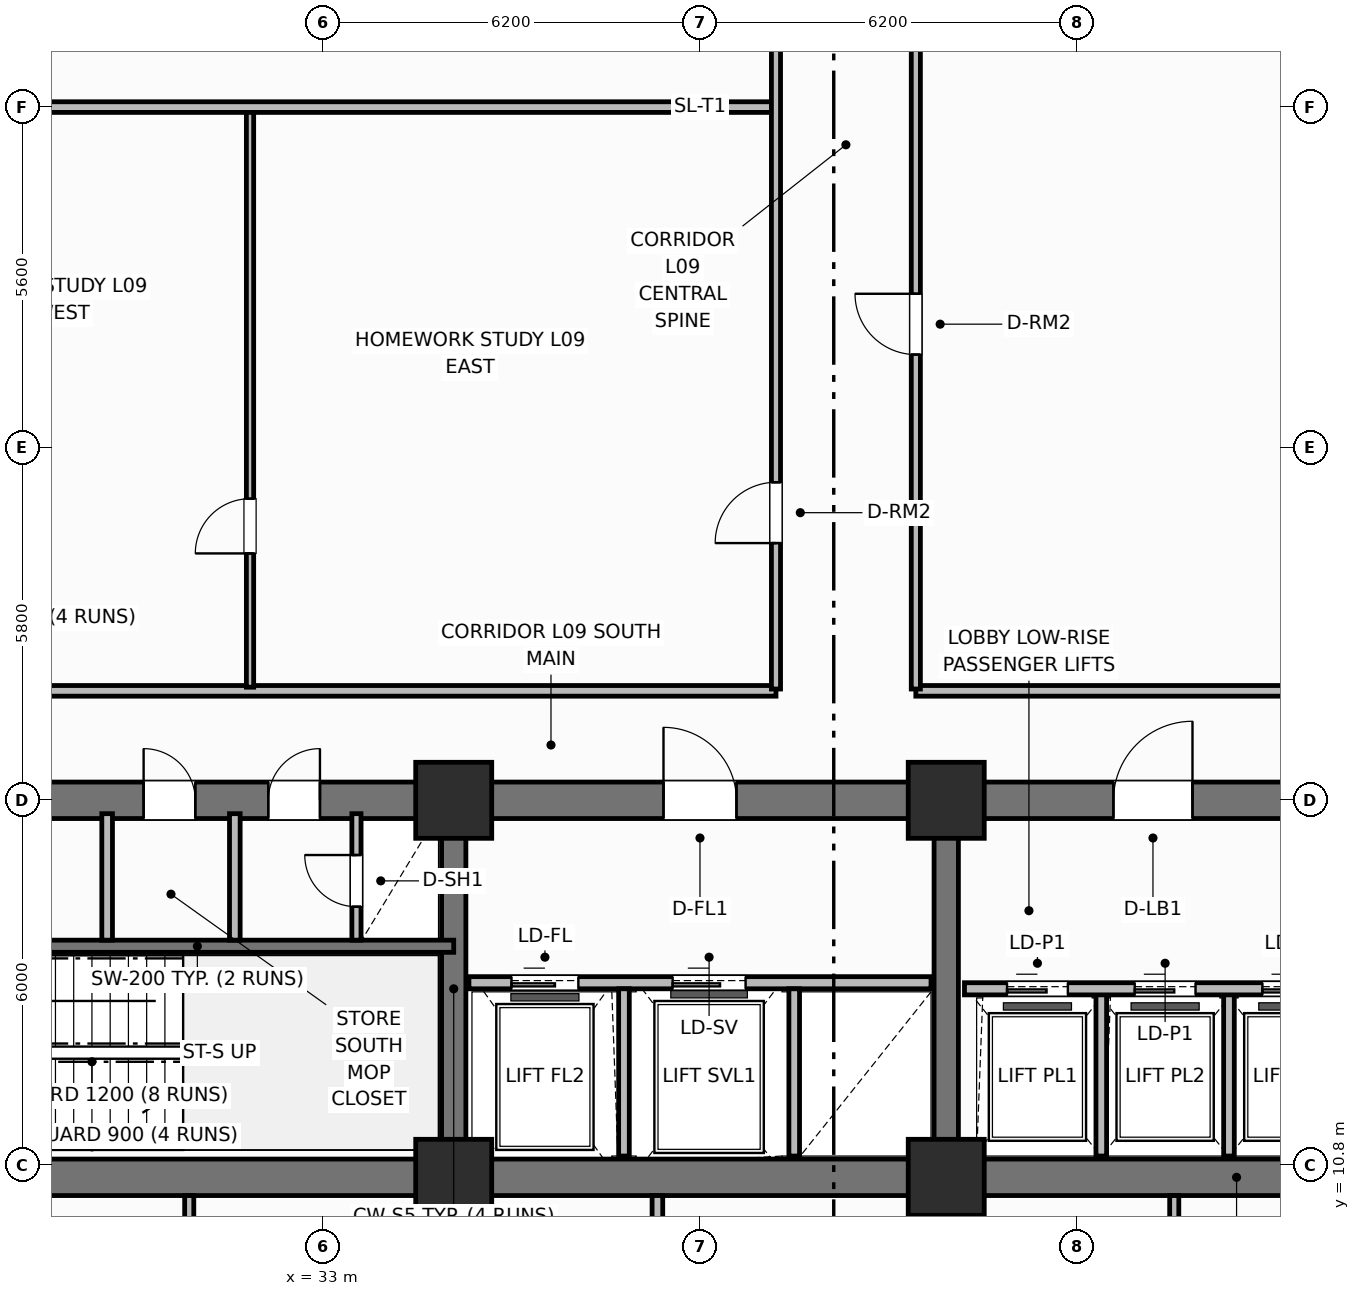
"""IFC4 building model, lengths in metres.
Left out: names, types, materials, properties, quantities, classifications, styles, units other than length and angle.
Written with IfcOpenShell. Run it as: python <this file> out.ifc"""

import sys

from ifc_helpers import new_model, si_unit, direction, frame, frame_2d, origin, origin_2d, place, context, subcontext, project, spatial, rectangle, extrude, element, fill, save


model = new_model("IFC4")
c1 = context("Model", 3, precision=1e-05, world=origin(), true_north=direction((0.0, 1.0)))
c2 = subcontext(c1, "Body", "Model", "MODEL_VIEW")
j1 = project(units=[si_unit("LENGTHUNIT", "METRE"), si_unit("PLANEANGLEUNIT", "RADIAN")], contexts=[c1])
p1 = place(None, origin())
s1 = spatial("IfcSite", under=j1, at=p1, CompositionType="ELEMENT")
p2 = place(p1, origin())
s2 = spatial("IfcBuilding", under=s1, at=p2, CompositionType="ELEMENT")
p3 = place(p2, frame((0.0, 0.0, 39.9)))
s3 = spatial("IfcBuildingStorey", under=s2, at=p3, CompositionType="ELEMENT", Elevation=39.9)
p4 = place(p3, frame((52.8, 10.6, 0.0), z_axis=(0.0, 0.0, 1.0), x_axis=(-1.0, 0.0, 0.0)))
e1 = element("IfcWall", 1, at=p4, inside=s3, PredefinedType="SHEAR", context=c2, shape_type="SweptSolid", body=[
    extrude(rectangle(XDim=27.2, YDim=0.6, at=frame_2d((13.6, 0.0))), origin(), (0.0, 0.0, 1.0), 3.7),
])
p5 = place(p3, frame((25.6, 16.8, 0.0), z_axis=(0.0, 0.0, 1.0), x_axis=(1.0, 0.0, 0.0)))
e2 = element("IfcWall", 2, at=p5, inside=s3, PredefinedType="SHEAR", context=c2, shape_type="SweptSolid", body=[
    extrude(rectangle(XDim=27.2, YDim=0.6, at=frame_2d((13.6, 0.0))), origin(), (0.0, 0.0, 1.0), 3.7),
])
p6 = place(p5, frame((1.7, 0.0, 0.0)))
e3 = element("IfcOpeningElement", 3, at=p6, cuts=e2, PredefinedType="OPENING", context=c2, shape_type="SweptSolid", body=[
    extrude(rectangle(XDim=1.1, YDim=2.15, at=frame_2d((0.55, 1.075))), frame((0.0, 0.31, 0.0), z_axis=(0.0, -1.0, 0.0), x_axis=(1.0, 0.0, 0.0)), (0.0, 0.0, 1.0), 0.62),
])
p7 = place(p5, frame((4.45, 0.0, 0.0)))
e4 = element("IfcOpeningElement", 4, at=p7, cuts=e2, PredefinedType="OPENING", context=c2, shape_type="SweptSolid", body=[
    extrude(rectangle(XDim=0.85, YDim=2.1, at=frame_2d((0.425, 1.05))), frame((0.0, 0.31, 0.0), z_axis=(0.0, -1.0, 0.0), x_axis=(1.0, 0.0, 0.0)), (0.0, 0.0, 1.0), 0.62),
])
p8 = place(p5, frame((6.5, 0.0, 0.0)))
e5 = element("IfcOpeningElement", 5, at=p8, cuts=e2, PredefinedType="OPENING", context=c2, shape_type="SweptSolid", body=[
    extrude(rectangle(XDim=0.85, YDim=2.1, at=frame_2d((0.425, 1.05))), frame((0.0, 0.31, 0.0), z_axis=(0.0, -1.0, 0.0), x_axis=(1.0, 0.0, 0.0)), (0.0, 0.0, 1.0), 0.62),
])
p9 = place(p5, frame((13.0, 0.0, 0.0)))
e6 = element("IfcOpeningElement", 6, at=p9, cuts=e2, PredefinedType="OPENING", context=c2, shape_type="SweptSolid", body=[
    extrude(rectangle(XDim=1.2, YDim=2.15, at=frame_2d((0.6, 1.075))), frame((0.0, 0.31, 0.0), z_axis=(0.0, -1.0, 0.0), x_axis=(1.0, 0.0, 0.0)), (0.0, 0.0, 1.0), 0.62),
])
p10 = place(p5, frame((20.4, 0.0, 0.0)))
e7 = element("IfcOpeningElement", 7, at=p10, cuts=e2, PredefinedType="OPENING", context=c2, shape_type="SweptSolid", body=[
    extrude(rectangle(XDim=1.3, YDim=2.2, at=frame_2d((0.65, 1.1))), frame((0.0, 0.31, 0.0), z_axis=(0.0, -1.0, 0.0), x_axis=(1.0, 0.0, 0.0)), (0.0, 0.0, 1.0), 0.62),
])
p11 = place(p5, frame((24.65, 0.0, 0.0)))
e8 = element("IfcOpeningElement", 8, at=p11, cuts=e2, PredefinedType="OPENING", context=c2, shape_type="SweptSolid", body=[
    extrude(rectangle(XDim=0.85, YDim=2.1, at=frame_2d((0.425, 1.05))), frame((0.0, 0.31, 0.0), z_axis=(0.0, -1.0, 0.0), x_axis=(1.0, 0.0, 0.0)), (0.0, 0.0, 1.0), 0.62),
])
for number, where, z_axis, x_axis in (
    (9, (35.15, 10.9, 0.0), (0.0, 0.0, 1.0), (0.0, 1.0, 0.0)),
    (10, (43.25, 10.9, 0.0), (0.0, 0.0, 1.0), (0.0, 1.0, 0.0)),
):
    element("IfcWall", number, at=place(p3, frame(where, z_axis=z_axis, x_axis=x_axis)), inside=s3, PredefinedType="SHEAR", context=c2, shape_type="SweptSolid", body=[
        extrude(rectangle(XDim=5.6, YDim=0.4, at=frame_2d((2.8, 0.0))), origin(), (0.0, 0.0, 1.0), 3.7),
    ])
for number, where, z_axis, x_axis in (
    (11, (35.15, 10.6, 0.0), (0.0, 0.0, 1.0), (1.0, 0.0, 0.0)),
    (12, (35.15, 16.8, 0.0), (0.0, 0.0, 1.0), (1.0, 0.0, 0.0)),
    (13, (43.25, 10.6, 0.0), (0.0, 0.0, 1.0), (1.0, 0.0, 0.0)),
    (14, (43.25, 16.8, 0.0), (0.0, 0.0, 1.0), (1.0, 0.0, 0.0)),
):
    element("IfcColumn", number, at=place(p3, frame(where, z_axis=z_axis, x_axis=x_axis)), inside=s3, PredefinedType="COLUMN", context=c2, shape_type="SweptSolid", body=[
        extrude(rectangle(XDim=1.25, YDim=1.25, at=origin_2d()), origin(), (0.0, 0.0, 1.0), 3.7),
    ])
p12 = place(p3, frame((25.6, 14.4, 0.0), z_axis=(0.0, 0.0, 1.0), x_axis=(1.0, 0.0, 0.0)))
e15 = element("IfcWall", 15, at=p12, inside=s3, PredefinedType="SHEAR", context=c2, shape_type="SweptSolid", body=[
    extrude(rectangle(XDim=9.55, YDim=0.2, at=frame_2d((4.775, 0.0))), origin(), (0.0, 0.0, 1.0), 3.7),
])
p13 = place(p12, frame((1.05, 0.0, 0.0)))
e16 = element("IfcOpeningElement", 16, at=p13, cuts=e15, PredefinedType="OPENING", context=c2, shape_type="SweptSolid", body=[
    extrude(rectangle(XDim=1.1, YDim=2.15, at=frame_2d((0.55, 1.075))), frame((0.0, 0.11, 0.0), z_axis=(0.0, -1.0, 0.0), x_axis=(1.0, 0.0, 0.0)), (0.0, 0.0, 1.0), 0.22),
])
for number, where, z_axis, x_axis in (
    (17, (29.45, 14.5, 0.0), (0.0, 0.0, 1.0), (0.0, 1.0, 0.0)),
    (18, (31.55, 14.5, 0.0), (0.0, 0.0, 1.0), (0.0, 1.0, 0.0)),
):
    element("IfcWall", number, at=place(p3, frame(where, z_axis=z_axis, x_axis=x_axis)), inside=s3, PredefinedType="PARTITIONING", context=c2, shape_type="SweptSolid", body=[
        extrude(rectangle(XDim=2.08, YDim=0.175, at=frame_2d((1.04, 0.0))), origin(), (0.0, 0.0, 1.0), 2.53),
    ])
p14 = place(p3, frame((33.55, 14.5, 0.0), z_axis=(0.0, 0.0, 1.0), x_axis=(0.0, 1.0, 0.0)))
e19 = element("IfcWall", 19, at=p14, inside=s3, PredefinedType="PARTITIONING", context=c2, shape_type="SweptSolid", body=[
    extrude(rectangle(XDim=2.08, YDim=0.15, at=frame_2d((1.04, 0.0))), origin(), (0.0, 0.0, 1.0), 2.53),
])
p15 = place(p14, frame((0.55, 0.0, 0.0)))
e20 = element("IfcOpeningElement", 20, at=p15, cuts=e19, PredefinedType="OPENING", context=c2, shape_type="SweptSolid", body=[
    extrude(rectangle(XDim=0.85, YDim=2.05, at=frame_2d((0.425, 1.025))), frame((0.0, 0.085, 0.0), z_axis=(0.0, -1.0, 0.0), x_axis=(1.0, 0.0, 0.0)), (0.0, 0.0, 1.0), 0.17),
])
p16 = place(p3, frame((35.4, 13.8, 0.0), z_axis=(0.0, 0.0, 1.0), x_axis=(1.0, 0.0, 0.0)))
e21 = element("IfcWall", 21, at=p16, inside=s3, PredefinedType="PARTITIONING", context=c2, shape_type="SweptSolid", body=[
    extrude(rectangle(XDim=7.6, YDim=0.2, at=frame_2d((3.8, 0.0))), origin(), (0.0, 0.0, 1.0), 2.3),
])
p17 = place(p16, frame((0.7, 0.0, 0.0)))
e22 = element("IfcOpeningElement", 22, at=p17, cuts=e21, PredefinedType="OPENING", context=c2, shape_type="SweptSolid", body=[
    extrude(rectangle(XDim=1.1, YDim=2.15, at=frame_2d((0.55, 1.075))), frame((0.0, 0.11, 0.0), z_axis=(0.0, -1.0, 0.0), x_axis=(1.0, 0.0, 0.0)), (0.0, 0.0, 1.0), 0.22),
])
p18 = place(p16, frame((3.35, 0.0, 0.0)))
e23 = element("IfcOpeningElement", 23, at=p18, cuts=e21, PredefinedType="OPENING", context=c2, shape_type="SweptSolid", body=[
    extrude(rectangle(XDim=1.2, YDim=2.15, at=frame_2d((0.6, 1.075))), frame((0.0, 0.11, 0.0), z_axis=(0.0, -1.0, 0.0), x_axis=(1.0, 0.0, 0.0)), (0.0, 0.0, 1.0), 0.22),
])
for number, where, z_axis, x_axis in (
    (24, (37.95, 10.95, 0.0), (0.0, 0.0, 1.0), (0.0, 1.0, 0.0)),
    (25, (40.75, 10.95, 0.0), (0.0, 0.0, 1.0), (0.0, 1.0, 0.0)),
):
    element("IfcWall", number, at=place(p3, frame(where, z_axis=z_axis, x_axis=x_axis)), inside=s3, PredefinedType="PARTITIONING", context=c2, shape_type="SweptSolid", body=[
        extrude(rectangle(XDim=2.75, YDim=0.175, at=frame_2d((1.375, 0.0))), origin(), (0.0, 0.0, 1.0), 2.53),
    ])
for number, where, z_axis, x_axis in (
    (26, (45.8, 10.95, 0.0), (0.0, 0.0, 1.0), (0.0, 1.0, 0.0)),
    (27, (47.9, 10.95, 0.0), (0.0, 0.0, 1.0), (0.0, 1.0, 0.0)),
):
    element("IfcWall", number, at=place(p3, frame(where, z_axis=z_axis, x_axis=x_axis)), inside=s3, PredefinedType="PARTITIONING", context=c2, shape_type="SweptSolid", body=[
        extrude(rectangle(XDim=2.7, YDim=0.175, at=frame_2d((1.35, 0.0))), origin(), (0.0, 0.0, 1.0), 2.53),
    ])
p19 = place(p3, frame((43.55, 13.7, 0.0), z_axis=(0.0, 0.0, 1.0), x_axis=(1.0, 0.0, 0.0)))
e28 = element("IfcWall", 28, at=p19, inside=s3, PredefinedType="PARTITIONING", context=c2, shape_type="SweptSolid", body=[
    extrude(rectangle(XDim=6.4, YDim=0.2, at=frame_2d((3.2, 0.0))), origin(), (0.0, 0.0, 1.0), 2.53),
])
p20 = place(p19, frame((0.7, 0.0, 0.0)))
e29 = element("IfcOpeningElement", 29, at=p20, cuts=e28, PredefinedType="OPENING", context=c2, shape_type="SweptSolid", body=[
    extrude(rectangle(XDim=1.0, YDim=2.15, at=frame_2d((0.5, 1.075))), frame((0.0, 0.11, 0.0), z_axis=(0.0, -1.0, 0.0), x_axis=(1.0, 0.0, 0.0)), (0.0, 0.0, 1.0), 0.22),
])
p21 = place(p19, frame((2.8, 0.0, 0.0)))
e30 = element("IfcOpeningElement", 30, at=p21, cuts=e28, PredefinedType="OPENING", context=c2, shape_type="SweptSolid", body=[
    extrude(rectangle(XDim=1.0, YDim=2.15, at=frame_2d((0.5, 1.075))), frame((0.0, 0.11, 0.0), z_axis=(0.0, -1.0, 0.0), x_axis=(1.0, 0.0, 0.0)), (0.0, 0.0, 1.0), 0.22),
])
p22 = place(p19, frame((4.9, 0.0, 0.0)))
e31 = element("IfcOpeningElement", 31, at=p22, cuts=e28, PredefinedType="OPENING", context=c2, shape_type="SweptSolid", body=[
    extrude(rectangle(XDim=1.0, YDim=2.15, at=frame_2d((0.5, 1.075))), frame((0.0, 0.11, 0.0), z_axis=(0.0, -1.0, 0.0), x_axis=(1.0, 0.0, 0.0)), (0.0, 0.0, 1.0), 0.22),
])
p23 = place(p3, frame((25.55, 18.6, 0.0), z_axis=(0.0, 0.0, 1.0), x_axis=(1.0, 0.0, 0.0)))
e32 = element("IfcWall", 32, at=p23, inside=s3, PredefinedType="PARTITIONING", context=c2, shape_type="SweptSolid", body=[
    extrude(rectangle(XDim=14.9, YDim=0.175, at=frame_2d((7.45, 0.0))), origin(), (0.0, 0.0, 1.0), 2.53),
])
p24 = place(p3, frame((42.75, 18.6, 0.0), z_axis=(0.0, 0.0, 1.0), x_axis=(1.0, 0.0, 0.0)))
e33 = element("IfcWall", 33, at=p24, inside=s3, PredefinedType="PARTITIONING", context=c2, shape_type="SweptSolid", body=[
    extrude(rectangle(XDim=10.1, YDim=0.175, at=frame_2d((5.05, 0.0))), origin(), (0.0, 0.0, 1.0), 2.53),
])
p25 = place(p3, frame((31.8, 18.66, 0.0), z_axis=(0.0, 0.0, 1.0), x_axis=(0.0, 1.0, 0.0)))
e34 = element("IfcWall", 34, at=p25, inside=s3, PredefinedType="PARTITIONING", context=c2, shape_type="SweptSolid", body=[
    extrude(rectangle(XDim=9.49, YDim=0.12, at=frame_2d((4.745, 0.0))), origin(), (0.0, 0.0, 1.0), 2.53),
])
p26 = place(p25, frame((2.2, 0.0, 0.0)))
e35 = element("IfcOpeningElement", 35, at=p26, cuts=e34, PredefinedType="OPENING", context=c2, shape_type="SweptSolid", body=[
    extrude(rectangle(XDim=0.9, YDim=2.1, at=frame_2d((0.45, 1.05))), frame((0.0, 0.07, 0.0), z_axis=(0.0, -1.0, 0.0), x_axis=(1.0, 0.0, 0.0)), (0.0, 0.0, 1.0), 0.14),
])
p27 = place(p3, frame((25.6, 28.2, 0.0), z_axis=(0.0, 0.0, 1.0), x_axis=(1.0, 0.0, 0.0)))
e36 = element("IfcWall", 36, at=p27, inside=s3, PredefinedType="PARTITIONING", context=c2, shape_type="SweptSolid", body=[
    extrude(rectangle(XDim=14.87, YDim=0.175, at=frame_2d((7.435, 0.0))), origin(), (0.0, 0.0, 1.0), 2.53),
])
p28 = place(p3, frame((40.45, 18.63, 0.0), z_axis=(0.0, 0.0, 1.0), x_axis=(0.0, 1.0, 0.0)))
e37 = element("IfcWall", 37, at=p28, inside=s3, PredefinedType="PARTITIONING", context=c2, shape_type="SweptSolid", body=[
    extrude(rectangle(XDim=19.14, YDim=0.15, at=frame_2d((9.57, 0.0))), origin(), (0.0, 0.0, 1.0), 2.53),
])
p29 = place(p28, frame((2.4, 0.0, 0.0)))
e38 = element("IfcOpeningElement", 38, at=p29, cuts=e37, PredefinedType="OPENING", context=c2, shape_type="SweptSolid", body=[
    extrude(rectangle(XDim=1.0, YDim=2.15, at=frame_2d((0.5, 1.075))), frame((0.0, 0.085, 0.0), z_axis=(0.0, -1.0, 0.0), x_axis=(1.0, 0.0, 0.0)), (0.0, 0.0, 1.0), 0.17),
])
p30 = place(p28, frame((11.4, 0.0, 0.0)))
e39 = element("IfcOpeningElement", 39, at=p30, cuts=e37, PredefinedType="OPENING", context=c2, shape_type="SweptSolid", body=[
    extrude(rectangle(XDim=1.0, YDim=2.15, at=frame_2d((0.5, 1.075))), frame((0.0, 0.085, 0.0), z_axis=(0.0, -1.0, 0.0), x_axis=(1.0, 0.0, 0.0)), (0.0, 0.0, 1.0), 0.17),
])
p31 = place(p3, frame((42.75, 18.63, 0.0), z_axis=(0.0, 0.0, 1.0), x_axis=(0.0, 1.0, 0.0)))
e40 = element("IfcWall", 40, at=p31, inside=s3, PredefinedType="PARTITIONING", context=c2, shape_type="SweptSolid", body=[
    extrude(rectangle(XDim=19.14, YDim=0.15, at=frame_2d((9.57, 0.0))), origin(), (0.0, 0.0, 1.0), 2.53),
])
p32 = place(p31, frame((5.5, 0.0, 0.0)))
e41 = element("IfcOpeningElement", 41, at=p32, cuts=e40, PredefinedType="OPENING", context=c2, shape_type="SweptSolid", body=[
    extrude(rectangle(XDim=1.0, YDim=2.15, at=frame_2d((0.5, 1.075))), frame((0.0, 0.085, 0.0), z_axis=(0.0, -1.0, 0.0), x_axis=(1.0, 0.0, 0.0)), (0.0, 0.0, 1.0), 0.17),
])
p33 = place(p3, frame((30.8, 4.97, 0.0), z_axis=(0.0, 0.0, 1.0), x_axis=(0.0, 1.0, 0.0)))
e42 = element("IfcWall", 42, at=p33, inside=s3, PredefinedType="PARTITIONING", context=c2, shape_type="SweptSolid", body=[
    extrude(rectangle(XDim=5.33, YDim=0.15, at=frame_2d((2.665, 0.0))), origin(), (0.0, 0.0, 1.0), 2.53),
])
p34 = place(p33, frame((1.6, 0.0, 0.0)))
e43 = element("IfcOpeningElement", 43, at=p34, cuts=e42, PredefinedType="OPENING", context=c2, shape_type="SweptSolid", body=[
    extrude(rectangle(XDim=0.9, YDim=2.1, at=frame_2d((0.45, 1.05))), frame((0.0, 0.085, 0.0), z_axis=(0.0, -1.0, 0.0), x_axis=(1.0, 0.0, 0.0)), (0.0, 0.0, 1.0), 0.17),
])
p35 = place(p3, frame((38.5, 4.97, 0.0), z_axis=(0.0, 0.0, 1.0), x_axis=(0.0, 1.0, 0.0)))
e44 = element("IfcWall", 44, at=p35, inside=s3, PredefinedType="PARTITIONING", context=c2, shape_type="SweptSolid", body=[
    extrude(rectangle(XDim=5.33, YDim=0.175, at=frame_2d((2.665, 0.0))), origin(), (0.0, 0.0, 1.0), 2.53),
])
p36 = place(p3, frame((47.0, 4.97, 0.0), z_axis=(0.0, 0.0, 1.0), x_axis=(0.0, 1.0, 0.0)))
e45 = element("IfcWall", 45, at=p36, inside=s3, PredefinedType="PARTITIONING", context=c2, shape_type="SweptSolid", body=[
    extrude(rectangle(XDim=5.33, YDim=0.15, at=frame_2d((2.665, 0.0))), origin(), (0.0, 0.0, 1.0), 2.53),
])
p37 = place(p36, frame((1.6, 0.0, 0.0)))
e46 = element("IfcOpeningElement", 46, at=p37, cuts=e45, PredefinedType="OPENING", context=c2, shape_type="SweptSolid", body=[
    extrude(rectangle(XDim=0.9, YDim=2.1, at=frame_2d((0.45, 1.05))), frame((0.0, 0.085, 0.0), z_axis=(0.0, -1.0, 0.0), x_axis=(1.0, 0.0, 0.0)), (0.0, 0.0, 1.0), 0.17),
])
p38 = place(p15, origin())
e47 = element("IfcDoor", 47, at=p38, inside=s3, OperationType="SINGLE_SWING_RIGHT", PredefinedType="TRAPDOOR", context=c2, shape_type="SweptSolid", body=[
    extrude(rectangle(XDim=0.85, YDim=2.05, at=frame_2d((0.425, 1.025))), frame((0.0, 0.025, 0.0), z_axis=(0.0, -1.0, 0.0), x_axis=(1.0, 0.0, 0.0)), (0.0, 0.0, 1.0), 0.05),
])
fill(e20, e47)
p39 = place(p17, origin())
e48 = element("IfcDoor", 48, at=p39, inside=s3, OperationType="SLIDING_TO_LEFT", PredefinedType="DOOR", context=c2, shape_type="SweptSolid", body=[
    extrude(rectangle(XDim=1.1, YDim=2.15, at=frame_2d((0.55, 1.075))), frame((0.0, 0.025, 0.0), z_axis=(0.0, -1.0, 0.0), x_axis=(1.0, 0.0, 0.0)), (0.0, 0.0, 1.0), 0.05),
])
fill(e22, e48)
p40 = place(p18, origin())
e49 = element("IfcDoor", 49, at=p40, inside=s3, OperationType="SLIDING_TO_LEFT", PredefinedType="DOOR", context=c2, shape_type="SweptSolid", body=[
    extrude(rectangle(XDim=1.2, YDim=2.15, at=frame_2d((0.6, 1.075))), frame((0.0, 0.025, 0.0), z_axis=(0.0, -1.0, 0.0), x_axis=(1.0, 0.0, 0.0)), (0.0, 0.0, 1.0), 0.05),
])
fill(e23, e49)
p41 = place(p20, origin())
e50 = element("IfcDoor", 50, at=p41, inside=s3, OperationType="SLIDING_TO_LEFT", PredefinedType="DOOR", context=c2, shape_type="SweptSolid", body=[
    extrude(rectangle(XDim=1.0, YDim=2.15, at=frame_2d((0.5, 1.075))), frame((0.0, 0.025, 0.0), z_axis=(0.0, -1.0, 0.0), x_axis=(1.0, 0.0, 0.0)), (0.0, 0.0, 1.0), 0.05),
])
fill(e29, e50)
p42 = place(p21, origin())
e51 = element("IfcDoor", 51, at=p42, inside=s3, OperationType="SLIDING_TO_LEFT", PredefinedType="DOOR", context=c2, shape_type="SweptSolid", body=[
    extrude(rectangle(XDim=1.0, YDim=2.15, at=frame_2d((0.5, 1.075))), frame((0.0, 0.025, 0.0), z_axis=(0.0, -1.0, 0.0), x_axis=(1.0, 0.0, 0.0)), (0.0, 0.0, 1.0), 0.05),
])
fill(e30, e51)
p43 = place(p22, origin())
e52 = element("IfcDoor", 52, at=p43, inside=s3, OperationType="SLIDING_TO_LEFT", PredefinedType="DOOR", context=c2, shape_type="SweptSolid", body=[
    extrude(rectangle(XDim=1.0, YDim=2.15, at=frame_2d((0.5, 1.075))), frame((0.0, 0.025, 0.0), z_axis=(0.0, -1.0, 0.0), x_axis=(1.0, 0.0, 0.0)), (0.0, 0.0, 1.0), 0.05),
])
fill(e31, e52)
p44 = place(p26, origin())
e53 = element("IfcDoor", 53, at=p44, inside=s3, OperationType="SINGLE_SWING_LEFT", PredefinedType="DOOR", context=c2, shape_type="SweptSolid", body=[
    extrude(rectangle(XDim=0.9, YDim=2.1, at=frame_2d((0.45, 1.05))), frame((0.0, 0.025, 0.0), z_axis=(0.0, -1.0, 0.0), x_axis=(1.0, 0.0, 0.0)), (0.0, 0.0, 1.0), 0.05),
])
fill(e35, e53)
p45 = place(p29, origin())
e54 = element("IfcDoor", 54, at=p45, inside=s3, OperationType="SINGLE_SWING_LEFT", PredefinedType="DOOR", context=c2, shape_type="SweptSolid", body=[
    extrude(rectangle(XDim=1.0, YDim=2.15, at=frame_2d((0.5, 1.075))), frame((0.0, 0.025, 0.0), z_axis=(0.0, -1.0, 0.0), x_axis=(1.0, 0.0, 0.0)), (0.0, 0.0, 1.0), 0.05),
])
fill(e38, e54)
p46 = place(p32, origin())
e55 = element("IfcDoor", 55, at=p46, inside=s3, OperationType="SINGLE_SWING_RIGHT", PredefinedType="DOOR", context=c2, shape_type="SweptSolid", body=[
    extrude(rectangle(XDim=1.0, YDim=2.15, at=frame_2d((0.5, 1.075))), frame((0.0, 0.025, 0.0), z_axis=(0.0, -1.0, 0.0), x_axis=(1.0, 0.0, 0.0)), (0.0, 0.0, 1.0), 0.05),
])
fill(e41, e55)
p47 = place(p7, origin())
e56 = element("IfcDoor", 56, at=p47, inside=s3, OperationType="SINGLE_SWING_LEFT", PredefinedType="DOOR", context=c2, shape_type="SweptSolid", body=[
    extrude(rectangle(XDim=0.85, YDim=2.1, at=frame_2d((0.425, 1.05))), frame((0.0, 0.025, 0.0), z_axis=(0.0, -1.0, 0.0), x_axis=(1.0, 0.0, 0.0)), (0.0, 0.0, 1.0), 0.05),
])
fill(e4, e56)
p48 = place(p8, origin())
e57 = element("IfcDoor", 57, at=p48, inside=s3, OperationType="SINGLE_SWING_RIGHT", PredefinedType="DOOR", context=c2, shape_type="SweptSolid", body=[
    extrude(rectangle(XDim=0.85, YDim=2.1, at=frame_2d((0.425, 1.05))), frame((0.0, 0.025, 0.0), z_axis=(0.0, -1.0, 0.0), x_axis=(1.0, 0.0, 0.0)), (0.0, 0.0, 1.0), 0.05),
])
fill(e5, e57)
p49 = place(p9, origin())
e58 = element("IfcDoor", 58, at=p49, inside=s3, OperationType="SINGLE_SWING_LEFT", PredefinedType="DOOR", context=c2, shape_type="SweptSolid", body=[
    extrude(rectangle(XDim=1.2, YDim=2.15, at=frame_2d((0.6, 1.075))), frame((0.0, 0.025, 0.0), z_axis=(0.0, -1.0, 0.0), x_axis=(1.0, 0.0, 0.0)), (0.0, 0.0, 1.0), 0.05),
])
fill(e6, e58)
p50 = place(p10, origin())
e59 = element("IfcDoor", 59, at=p50, inside=s3, OperationType="SINGLE_SWING_RIGHT", PredefinedType="DOOR", context=c2, shape_type="SweptSolid", body=[
    extrude(rectangle(XDim=1.3, YDim=2.2, at=frame_2d((0.65, 1.1))), frame((0.0, 0.025, 0.0), z_axis=(0.0, -1.0, 0.0), x_axis=(1.0, 0.0, 0.0)), (0.0, 0.0, 1.0), 0.05),
])
fill(e7, e59)
save(model, sys.argv[1])
